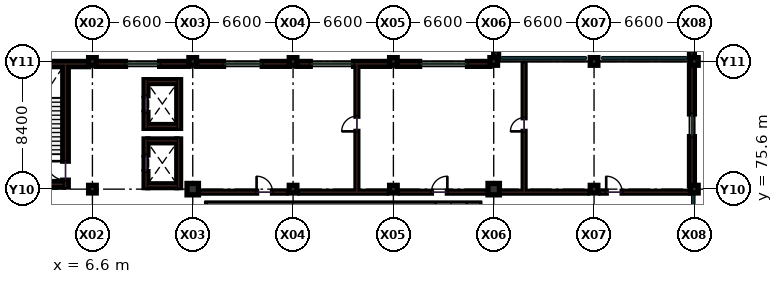
"""IFC4 building model, lengths in metres.
Left out: names, types, materials, properties, quantities, classifications, styles, units other than length and angle.
Written with IfcOpenShell. Run it as: python <this file> out.ifc"""

import sys

from ifc_helpers import new_model, si_unit, direction, frame, frame_2d, origin, origin_2d, place, context, subcontext, project, spatial, rectangle, circle, extrude, element, fill, save


model = new_model("IFC4")
c1 = context("Model", 3, precision=1e-05, world=origin(), true_north=direction((0.0, 1.0)))
c2 = subcontext(c1, "Body", "Model", "MODEL_VIEW")
j1 = project(units=[si_unit("LENGTHUNIT", "METRE"), si_unit("PLANEANGLEUNIT", "RADIAN")], contexts=[c1])
p1 = place(None, origin())
s1 = spatial("IfcSite", under=j1, at=p1, CompositionType="ELEMENT")
p2 = place(p1, origin())
s2 = spatial("IfcBuilding", under=s1, at=p2, CompositionType="ELEMENT")
p3 = place(p2, frame((0.0, 0.0, 9.9)))
s3 = spatial("IfcBuildingStorey", under=s2, at=p3, CompositionType="ELEMENT", Elevation=9.9)
for number, where, z_axis, x_axis in (
    (1, (6.6, 75.6, 0.0), (0.0, 0.0, 1.0), (1.0, 0.0, 0.0)),
    (2, (6.6, 84.0, 0.0), (0.0, 0.0, 1.0), (1.0, 0.0, 0.0)),
):
    element("IfcColumn", number, at=place(p3, frame(where, z_axis=z_axis, x_axis=x_axis)), inside=s3, PredefinedType="COLUMN", context=c2, shape_type="SweptSolid", body=[
        extrude(rectangle(XDim=0.5, YDim=0.5, at=origin_2d()), origin(), (0.0, 0.0, 1.0), 4.5),
    ])
p4 = place(p3, frame((13.2, 75.6, 0.0), z_axis=(0.0, 0.0, 1.0), x_axis=(1.0, 0.0, 0.0)))
e3 = element("IfcColumn", 3, at=p4, inside=s3, PredefinedType="COLUMN", context=c2, shape_type="SweptSolid", body=[
    extrude(circle(Radius=0.375, at=origin_2d()), origin(), (0.0, 0.0, 1.0), 4.5),
])
for number, where, z_axis, x_axis in (
    (4, (13.2, 84.0, 0.0), (0.0, 0.0, 1.0), (1.0, 0.0, 0.0)),
    (5, (19.8, 75.6, 0.0), (0.0, 0.0, 1.0), (1.0, 0.0, 0.0)),
    (6, (19.8, 84.0, 0.0), (0.0, 0.0, 1.0), (1.0, 0.0, 0.0)),
    (7, (26.4, 75.6, 0.0), (0.0, 0.0, 1.0), (1.0, 0.0, 0.0)),
    (8, (26.4, 84.0, 0.0), (0.0, 0.0, 1.0), (1.0, 0.0, 0.0)),
):
    element("IfcColumn", number, at=place(p3, frame(where, z_axis=z_axis, x_axis=x_axis)), inside=s3, PredefinedType="COLUMN", context=c2, shape_type="SweptSolid", body=[
        extrude(rectangle(XDim=0.5, YDim=0.5, at=origin_2d()), origin(), (0.0, 0.0, 1.0), 4.5),
    ])
p5 = place(p3, frame((33.0, 75.6, 0.0), z_axis=(0.0, 0.0, 1.0), x_axis=(1.0, 0.0, 0.0)))
e9 = element("IfcColumn", 9, at=p5, inside=s3, PredefinedType="COLUMN", context=c2, shape_type="SweptSolid", body=[
    extrude(circle(Radius=0.375, at=origin_2d()), origin(), (0.0, 0.0, 1.0), 4.5),
])
for number, where, z_axis, x_axis in (
    (10, (33.0, 84.0, 0.0), (0.0, 0.0, 1.0), (1.0, 0.0, 0.0)),
    (11, (39.6, 75.6, 0.0), (0.0, 0.0, 1.0), (1.0, 0.0, 0.0)),
    (12, (39.6, 84.0, 0.0), (0.0, 0.0, 1.0), (1.0, 0.0, 0.0)),
    (13, (46.2, 75.6, 0.0), (0.0, 0.0, 1.0), (1.0, 0.0, 0.0)),
    (14, (46.2, 84.0, 0.0), (0.0, 0.0, 1.0), (1.0, 0.0, 0.0)),
):
    element("IfcColumn", number, at=place(p3, frame(where, z_axis=z_axis, x_axis=x_axis)), inside=s3, PredefinedType="COLUMN", context=c2, shape_type="SweptSolid", body=[
        extrude(rectangle(XDim=0.5, YDim=0.5, at=origin_2d()), origin(), (0.0, 0.0, 1.0), 4.5),
    ])
p6 = place(p3, frame((12.9, 75.4, 0.0), z_axis=(0.0, 0.0, 1.0), x_axis=(1.0, 0.0, 0.0)))
e15 = element("IfcWall", 15, at=p6, inside=s3, PredefinedType="PARTITIONING", context=c2, shape_type="SweptSolid", body=[
    extrude(rectangle(XDim=6.45, YDim=0.12, at=frame_2d((3.225, 0.0))), origin(), (0.0, 0.0, 1.0), 3.49),
])
p7 = place(p6, frame((4.5, 0.0, 0.0)))
e16 = element("IfcOpeningElement", 16, at=p7, cuts=e15, PredefinedType="OPENING", context=c2, shape_type="SweptSolid", body=[
    extrude(rectangle(XDim=1.05, YDim=2.15, at=frame_2d((0.525, 1.075))), frame((0.0, 0.07, 0.0), z_axis=(0.0, -1.0, 0.0), x_axis=(1.0, 0.0, 0.0)), (0.0, 0.0, 1.0), 0.14),
])
p8 = place(p3, frame((20.25, 75.4, 0.0), z_axis=(0.0, 0.0, 1.0), x_axis=(1.0, 0.0, 0.0)))
e17 = element("IfcWall", 17, at=p8, inside=s3, PredefinedType="PARTITIONING", context=c2, shape_type="SweptSolid", body=[
    extrude(rectangle(XDim=5.7, YDim=0.12, at=frame_2d((2.85, 0.0))), origin(), (0.0, 0.0, 1.0), 3.49),
])
p9 = place(p3, frame((26.85, 75.4, 0.0), z_axis=(0.0, 0.0, 1.0), x_axis=(1.0, 0.0, 0.0)))
e18 = element("IfcWall", 18, at=p9, inside=s3, PredefinedType="PARTITIONING", context=c2, shape_type="SweptSolid", body=[
    extrude(rectangle(XDim=5.7, YDim=0.12, at=frame_2d((2.85, 0.0))), origin(), (0.0, 0.0, 1.0), 3.49),
])
p10 = place(p9, frame((2.05, 0.0, 0.0)))
e19 = element("IfcOpeningElement", 19, at=p10, cuts=e18, PredefinedType="OPENING", context=c2, shape_type="SweptSolid", body=[
    extrude(rectangle(XDim=1.05, YDim=2.15, at=frame_2d((0.525, 1.075))), frame((0.0, 0.07, 0.0), z_axis=(0.0, -1.0, 0.0), x_axis=(1.0, 0.0, 0.0)), (0.0, 0.0, 1.0), 0.14),
])
p11 = place(p3, frame((33.45, 75.4, 0.0), z_axis=(0.0, 0.0, 1.0), x_axis=(1.0, 0.0, 0.0)))
e20 = element("IfcWall", 20, at=p11, inside=s3, PredefinedType="PARTITIONING", context=c2, shape_type="SweptSolid", body=[
    extrude(rectangle(XDim=5.7, YDim=0.12, at=frame_2d((2.85, 0.0))), origin(), (0.0, 0.0, 1.0), 3.49),
])
p12 = place(p3, frame((40.05, 75.4, 0.0), z_axis=(0.0, 0.0, 1.0), x_axis=(1.0, 0.0, 0.0)))
e21 = element("IfcWall", 21, at=p12, inside=s3, PredefinedType="PARTITIONING", context=c2, shape_type="SweptSolid", body=[
    extrude(rectangle(XDim=5.9, YDim=0.12, at=frame_2d((2.95, 0.0))), origin(), (0.0, 0.0, 1.0), 3.49),
])
p13 = place(p12, frame((0.35, 0.0, 0.0)))
e22 = element("IfcOpeningElement", 22, at=p13, cuts=e21, PredefinedType="OPENING", context=c2, shape_type="SweptSolid", body=[
    extrude(rectangle(XDim=1.05, YDim=2.15, at=frame_2d((0.525, 1.075))), frame((0.0, 0.07, 0.0), z_axis=(0.0, -1.0, 0.0), x_axis=(1.0, 0.0, 0.0)), (0.0, 0.0, 1.0), 0.14),
])
p14 = place(p3, frame((24.0, 75.4, 0.0), z_axis=(0.0, 0.0, 1.0), x_axis=(0.0, 1.0, 0.0)))
e23 = element("IfcWall", 23, at=p14, inside=s3, PredefinedType="PARTITIONING", context=c2, shape_type="SweptSolid", body=[
    extrude(rectangle(XDim=8.46, YDim=0.12, at=frame_2d((4.23, 0.0))), origin(), (0.0, 0.0, 1.0), 3.49),
])
p15 = place(p14, frame((4.0, 0.0, 0.0)))
e24 = element("IfcOpeningElement", 24, at=p15, cuts=e23, PredefinedType="OPENING", context=c2, shape_type="SweptSolid", body=[
    extrude(rectangle(XDim=1.0, YDim=2.2, at=frame_2d((0.5, 1.1))), frame((0.0, 0.07, 0.0), z_axis=(0.0, -1.0, 0.0), x_axis=(1.0, 0.0, 0.0)), (0.0, 0.0, 1.0), 0.14),
])
p16 = place(p3, frame((35.0, 75.4, 0.0), z_axis=(0.0, 0.0, 1.0), x_axis=(0.0, 1.0, 0.0)))
e25 = element("IfcWall", 25, at=p16, inside=s3, PredefinedType="PARTITIONING", context=c2, shape_type="SweptSolid", body=[
    extrude(rectangle(XDim=8.46, YDim=0.12, at=frame_2d((4.23, 0.0))), origin(), (0.0, 0.0, 1.0), 3.49),
])
p17 = place(p16, frame((4.0, 0.0, 0.0)))
e26 = element("IfcOpeningElement", 26, at=p17, cuts=e25, PredefinedType="OPENING", context=c2, shape_type="SweptSolid", body=[
    extrude(rectangle(XDim=0.9, YDim=2.1, at=frame_2d((0.45, 1.05))), frame((0.0, 0.07, 0.0), z_axis=(0.0, -1.0, 0.0), x_axis=(1.0, 0.0, 0.0)), (0.0, 0.0, 1.0), 0.14),
])
p18 = place(p3, frame((6.355, 83.83, 0.0), z_axis=(0.0, 0.0, 1.0), x_axis=(-1.0, 0.0, 0.0)))
e27 = element("IfcWall", 27, at=p18, inside=s3, PredefinedType="SHEAR", context=c2, shape_type="SweptSolid", body=[
    extrude(rectangle(XDim=6.11, YDim=0.34, at=frame_2d((3.055, 0.0))), origin(), (0.0, 0.0, 1.0), 4.24),
])
p19 = place(p3, frame((12.955, 83.84, 0.0), z_axis=(0.0, 0.0, 1.0), x_axis=(-1.0, 0.0, 0.0)))
e28 = element("IfcWall", 28, at=p19, inside=s3, PredefinedType="SOLIDWALL", context=c2, shape_type="SweptSolid", body=[
    extrude(rectangle(XDim=6.11, YDim=0.32, at=frame_2d((3.055, 0.0))), origin(), (0.0, 0.0, 1.0), 3.625),
])
p20 = place(p19, frame((1.93, 0.0, 0.95)))
e29 = element("IfcOpeningElement", 29, at=p20, cuts=e28, PredefinedType="OPENING", context=c2, shape_type="SweptSolid", body=[
    extrude(rectangle(XDim=2.25, YDim=1.55, at=frame_2d((1.125, 0.775))), frame((0.0, 0.17, 0.0), z_axis=(0.0, -1.0, 0.0), x_axis=(1.0, 0.0, 0.0)), (0.0, 0.0, 1.0), 0.34),
])
p21 = place(p3, frame((19.555, 83.84, 0.0), z_axis=(0.0, 0.0, 1.0), x_axis=(-1.0, 0.0, 0.0)))
e30 = element("IfcWall", 30, at=p21, inside=s3, PredefinedType="SOLIDWALL", context=c2, shape_type="SweptSolid", body=[
    extrude(rectangle(XDim=6.11, YDim=0.32, at=frame_2d((3.055, 0.0))), origin(), (0.0, 0.0, 1.0), 3.625),
])
p22 = place(p21, frame((1.78, 0.0, 0.95)))
e31 = element("IfcOpeningElement", 31, at=p22, cuts=e30, PredefinedType="OPENING", context=c2, shape_type="SweptSolid", body=[
    extrude(rectangle(XDim=2.55, YDim=1.65, at=frame_2d((1.275, 0.825))), frame((0.0, 0.17, 0.0), z_axis=(0.0, -1.0, 0.0), x_axis=(1.0, 0.0, 0.0)), (0.0, 0.0, 1.0), 0.34),
])
p23 = place(p3, frame((26.155, 83.84, 0.0), z_axis=(0.0, 0.0, 1.0), x_axis=(-1.0, 0.0, 0.0)))
e32 = element("IfcWall", 32, at=p23, inside=s3, PredefinedType="SOLIDWALL", context=c2, shape_type="SweptSolid", body=[
    extrude(rectangle(XDim=6.11, YDim=0.32, at=frame_2d((3.055, 0.0))), origin(), (0.0, 0.0, 1.0), 3.625),
])
p24 = place(p23, frame((2.375, 0.0, 0.95)))
e33 = element("IfcOpeningElement", 33, at=p24, cuts=e32, PredefinedType="OPENING", context=c2, shape_type="SweptSolid", body=[
    extrude(rectangle(XDim=2.85, YDim=1.65, at=frame_2d((1.425, 0.825))), frame((0.0, 0.17, 0.0), z_axis=(0.0, -1.0, 0.0), x_axis=(1.0, 0.0, 0.0)), (0.0, 0.0, 1.0), 0.34),
])
p25 = place(p3, frame((32.755, 83.84, 0.0), z_axis=(0.0, 0.0, 1.0), x_axis=(-1.0, 0.0, 0.0)))
e34 = element("IfcWall", 34, at=p25, inside=s3, PredefinedType="SOLIDWALL", context=c2, shape_type="SweptSolid", body=[
    extrude(rectangle(XDim=6.11, YDim=0.32, at=frame_2d((3.055, 0.0))), origin(), (0.0, 0.0, 1.0), 3.625),
])
p26 = place(p25, frame((1.48, 0.0, 0.95)))
e35 = element("IfcOpeningElement", 35, at=p26, cuts=e34, PredefinedType="OPENING", context=c2, shape_type="SweptSolid", body=[
    extrude(rectangle(XDim=3.15, YDim=1.7, at=frame_2d((1.575, 0.85))), frame((0.0, 0.17, 0.0), z_axis=(0.0, -1.0, 0.0), x_axis=(1.0, 0.0, 0.0)), (0.0, 0.0, 1.0), 0.34),
])
p27 = place(p3, frame((33.16, 92.155, 0.0), z_axis=(0.0, 0.0, 1.0), x_axis=(0.0, -1.0, 0.0)))
e36 = element("IfcWall", 36, at=p27, inside=s3, PredefinedType="SOLIDWALL", context=c2, shape_type="SweptSolid", body=[
    extrude(rectangle(XDim=7.91, YDim=0.32, at=frame_2d((3.955, 0.0))), origin(), (0.0, 0.0, 1.0), 3.625),
])
p28 = place(p27, frame((3.43, 0.0, 0.95)))
e37 = element("IfcOpeningElement", 37, at=p28, cuts=e36, PredefinedType="OPENING", context=c2, shape_type="SweptSolid", body=[
    extrude(rectangle(XDim=1.05, YDim=1.75, at=frame_2d((0.525, 0.875))), frame((0.0, 0.17, 0.0), z_axis=(0.0, -1.0, 0.0), x_axis=(1.0, 0.0, 0.0)), (0.0, 0.0, 1.0), 0.34),
])
p29 = place(p3, frame((46.04, 75.845, 0.0), z_axis=(0.0, 0.0, 1.0), x_axis=(0.0, 1.0, 0.0)))
e38 = element("IfcWall", 38, at=p29, inside=s3, PredefinedType="SOLIDWALL", context=c2, shape_type="SweptSolid", body=[
    extrude(rectangle(XDim=7.91, YDim=0.32, at=frame_2d((3.955, 0.0))), origin(), (0.0, 0.0, 1.0), 3.625),
])
p30 = place(p29, frame((3.205, 0.0, 0.95)))
e39 = element("IfcOpeningElement", 39, at=p30, cuts=e38, PredefinedType="OPENING", context=c2, shape_type="SweptSolid", body=[
    extrude(rectangle(XDim=1.5, YDim=2.1, at=frame_2d((0.75, 1.05))), frame((0.0, 0.17, 0.0), z_axis=(0.0, -1.0, 0.0), x_axis=(1.0, 0.0, 0.0)), (0.0, 0.0, 1.0), 0.34),
])
p31 = place(p3, frame((46.04, 84.245, 0.0), z_axis=(0.0, 0.0, 1.0), x_axis=(0.0, 1.0, 0.0)))
e40 = element("IfcWall", 40, at=p31, inside=s3, PredefinedType="SOLIDWALL", context=c2, shape_type="SweptSolid", body=[
    extrude(rectangle(XDim=7.91, YDim=0.32, at=frame_2d((3.955, 0.0))), origin(), (0.0, 0.0, 1.0), 3.625),
])
p32 = place(p31, frame((3.43, 0.0, 0.95)))
e41 = element("IfcOpeningElement", 41, at=p32, cuts=e40, PredefinedType="OPENING", context=c2, shape_type="SweptSolid", body=[
    extrude(rectangle(XDim=1.05, YDim=1.75, at=frame_2d((0.525, 0.875))), frame((0.0, 0.17, 0.0), z_axis=(0.0, -1.0, 0.0), x_axis=(1.0, 0.0, 0.0)), (0.0, 0.0, 1.0), 0.34),
])
p33 = place(p3, frame((4.83, 75.74, 0.0), z_axis=(0.0, 0.0, 1.0), x_axis=(0.0, 1.0, 0.0)))
e42 = element("IfcWall", 42, at=p33, inside=s3, PredefinedType="SHEAR", context=c2, shape_type="SweptSolid", body=[
    extrude(rectangle(XDim=8.09, YDim=0.36, at=frame_2d((4.045, 0.0))), origin(), (0.0, 0.0, 1.0), 4.24),
])
p34 = place(p33, frame((0.45, 0.0, 0.0)))
e43 = element("IfcOpeningElement", 43, at=p34, cuts=e42, PredefinedType="OPENING", context=c2, shape_type="SweptSolid", body=[
    extrude(rectangle(XDim=1.25, YDim=2.15, at=frame_2d((0.625, 1.075))), frame((0.0, 0.19, 0.0), z_axis=(0.0, -1.0, 0.0), x_axis=(1.0, 0.0, 0.0)), (0.0, 0.0, 1.0), 0.38),
])
p35 = place(p3, frame((0.85, 75.92, 0.0), z_axis=(0.0, 0.0, 1.0), x_axis=(1.0, 0.0, 0.0)))
e44 = element("IfcWall", 44, at=p35, inside=s3, PredefinedType="SHEAR", context=c2, shape_type="SweptSolid", body=[
    extrude(rectangle(XDim=3.8, YDim=0.36, at=frame_2d((1.9, 0.0))), origin(), (0.0, 0.0, 1.0), 4.24),
])
p36 = place(p3, frame((10.125, 75.7, 0.0), z_axis=(0.0, 0.0, 1.0), x_axis=(0.0, 1.0, 0.0)))
e45 = element("IfcWall", 45, at=p36, inside=s3, PredefinedType="SHEAR", context=c2, shape_type="SweptSolid", body=[
    extrude(rectangle(XDim=3.2, YDim=0.25, at=frame_2d((1.6, 0.0))), origin(), (0.0, 0.0, 1.0), 4.24),
])
p37 = place(p36, frame((1.05, 0.0, 0.0)))
e46 = element("IfcOpeningElement", 46, at=p37, cuts=e45, PredefinedType="OPENING", context=c2, shape_type="SweptSolid", body=[
    extrude(rectangle(XDim=1.1, YDim=2.15, at=frame_2d((0.55, 1.075))), frame((0.0, 0.135, 0.0), z_axis=(0.0, -1.0, 0.0), x_axis=(1.0, 0.0, 0.0)), (0.0, 0.0, 1.0), 0.27),
])
p38 = place(p3, frame((12.275, 75.7, 0.0), z_axis=(0.0, 0.0, 1.0), x_axis=(0.0, 1.0, 0.0)))
e47 = element("IfcWall", 47, at=p38, inside=s3, PredefinedType="SHEAR", context=c2, shape_type="SweptSolid", body=[
    extrude(rectangle(XDim=3.2, YDim=0.25, at=frame_2d((1.6, 0.0))), origin(), (0.0, 0.0, 1.0), 4.24),
])
for number, where, z_axis, x_axis in (
    (48, (10.25, 75.825, 0.0), (0.0, 0.0, 1.0), (1.0, 0.0, 0.0)),
    (49, (10.25, 78.775, 0.0), (0.0, 0.0, 1.0), (1.0, 0.0, 0.0)),
):
    element("IfcWall", number, at=place(p3, frame(where, z_axis=z_axis, x_axis=x_axis)), inside=s3, PredefinedType="SHEAR", context=c2, shape_type="SweptSolid", body=[
        extrude(rectangle(XDim=1.9, YDim=0.25, at=frame_2d((0.95, 0.0))), origin(), (0.0, 0.0, 1.0), 4.24),
    ])
p39 = place(p3, frame((10.125, 79.6, 0.0), z_axis=(0.0, 0.0, 1.0), x_axis=(0.0, 1.0, 0.0)))
e50 = element("IfcWall", 50, at=p39, inside=s3, PredefinedType="SHEAR", context=c2, shape_type="SweptSolid", body=[
    extrude(rectangle(XDim=3.2, YDim=0.25, at=frame_2d((1.6, 0.0))), origin(), (0.0, 0.0, 1.0), 4.24),
])
p40 = place(p39, frame((1.05, 0.0, 0.0)))
e51 = element("IfcOpeningElement", 51, at=p40, cuts=e50, PredefinedType="OPENING", context=c2, shape_type="SweptSolid", body=[
    extrude(rectangle(XDim=1.1, YDim=2.15, at=frame_2d((0.55, 1.075))), frame((0.0, 0.135, 0.0), z_axis=(0.0, -1.0, 0.0), x_axis=(1.0, 0.0, 0.0)), (0.0, 0.0, 1.0), 0.27),
])
p41 = place(p3, frame((12.275, 79.6, 0.0), z_axis=(0.0, 0.0, 1.0), x_axis=(0.0, 1.0, 0.0)))
e52 = element("IfcWall", 52, at=p41, inside=s3, PredefinedType="SHEAR", context=c2, shape_type="SweptSolid", body=[
    extrude(rectangle(XDim=3.2, YDim=0.25, at=frame_2d((1.6, 0.0))), origin(), (0.0, 0.0, 1.0), 4.24),
])
for number, where, z_axis, x_axis in (
    (53, (10.25, 79.725, 0.0), (0.0, 0.0, 1.0), (1.0, 0.0, 0.0)),
    (54, (10.25, 82.675, 0.0), (0.0, 0.0, 1.0), (1.0, 0.0, 0.0)),
):
    element("IfcWall", number, at=place(p3, frame(where, z_axis=z_axis, x_axis=x_axis)), inside=s3, PredefinedType="SHEAR", context=c2, shape_type="SweptSolid", body=[
        extrude(rectangle(XDim=1.9, YDim=0.25, at=frame_2d((0.95, 0.0))), origin(), (0.0, 0.0, 1.0), 4.24),
    ])
p42 = place(p7, origin())
e55 = element("IfcDoor", 55, at=p42, inside=s3, OperationType="SINGLE_SWING_LEFT", PredefinedType="DOOR", context=c2, shape_type="SweptSolid", body=[
    extrude(rectangle(XDim=1.05, YDim=2.15, at=frame_2d((0.525, 1.075))), frame((0.0, 0.025, 0.0), z_axis=(0.0, -1.0, 0.0), x_axis=(1.0, 0.0, 0.0)), (0.0, 0.0, 1.0), 0.05),
])
fill(e16, e55)
p43 = place(p10, origin())
e56 = element("IfcDoor", 56, at=p43, inside=s3, OperationType="SINGLE_SWING_RIGHT", PredefinedType="DOOR", context=c2, shape_type="SweptSolid", body=[
    extrude(rectangle(XDim=1.05, YDim=2.15, at=frame_2d((0.525, 1.075))), frame((0.0, 0.025, 0.0), z_axis=(0.0, -1.0, 0.0), x_axis=(1.0, 0.0, 0.0)), (0.0, 0.0, 1.0), 0.05),
])
fill(e19, e56)
p44 = place(p13, origin())
e57 = element("IfcDoor", 57, at=p44, inside=s3, OperationType="SINGLE_SWING_LEFT", PredefinedType="DOOR", context=c2, shape_type="SweptSolid", body=[
    extrude(rectangle(XDim=1.05, YDim=2.15, at=frame_2d((0.525, 1.075))), frame((0.0, 0.025, 0.0), z_axis=(0.0, -1.0, 0.0), x_axis=(1.0, 0.0, 0.0)), (0.0, 0.0, 1.0), 0.05),
])
fill(e22, e57)
p45 = place(p15, origin())
e58 = element("IfcDoor", 58, at=p45, inside=s3, OperationType="SINGLE_SWING_LEFT", PredefinedType="DOOR", context=c2, shape_type="SweptSolid", body=[
    extrude(rectangle(XDim=1.0, YDim=2.2, at=frame_2d((0.5, 1.1))), frame((0.0, 0.025, 0.0), z_axis=(0.0, -1.0, 0.0), x_axis=(1.0, 0.0, 0.0)), (0.0, 0.0, 1.0), 0.05),
])
fill(e24, e58)
p46 = place(p17, origin())
e59 = element("IfcDoor", 59, at=p46, inside=s3, OperationType="SINGLE_SWING_LEFT", PredefinedType="DOOR", context=c2, shape_type="SweptSolid", body=[
    extrude(rectangle(XDim=0.9, YDim=2.1, at=frame_2d((0.45, 1.05))), frame((0.0, 0.025, 0.0), z_axis=(0.0, -1.0, 0.0), x_axis=(1.0, 0.0, 0.0)), (0.0, 0.0, 1.0), 0.05),
])
fill(e26, e59)
p47 = place(p20, origin())
e60 = element("IfcWindow", 60, at=p47, inside=s3, PartitioningType="SINGLE_PANEL", PredefinedType="WINDOW", context=c2, shape_type="SweptSolid", body=[
    extrude(rectangle(XDim=2.25, YDim=1.55, at=frame_2d((1.125, 0.775))), frame((0.0, 0.03, 0.0), z_axis=(0.0, -1.0, 0.0), x_axis=(1.0, 0.0, 0.0)), (0.0, 0.0, 1.0), 0.06),
])
fill(e29, e60)
p48 = place(p22, origin())
e61 = element("IfcWindow", 61, at=p48, inside=s3, PartitioningType="SINGLE_PANEL", PredefinedType="WINDOW", context=c2, shape_type="SweptSolid", body=[
    extrude(rectangle(XDim=2.55, YDim=1.65, at=frame_2d((1.275, 0.825))), frame((0.0, 0.03, 0.0), z_axis=(0.0, -1.0, 0.0), x_axis=(1.0, 0.0, 0.0)), (0.0, 0.0, 1.0), 0.06),
])
fill(e31, e61)
p49 = place(p24, origin())
e62 = element("IfcWindow", 62, at=p49, inside=s3, PartitioningType="SINGLE_PANEL", PredefinedType="WINDOW", context=c2, shape_type="SweptSolid", body=[
    extrude(rectangle(XDim=2.85, YDim=1.65, at=frame_2d((1.425, 0.825))), frame((0.0, 0.03, 0.0), z_axis=(0.0, -1.0, 0.0), x_axis=(1.0, 0.0, 0.0)), (0.0, 0.0, 1.0), 0.06),
])
fill(e33, e62)
p50 = place(p26, origin())
e63 = element("IfcWindow", 63, at=p50, inside=s3, PartitioningType="SINGLE_PANEL", PredefinedType="WINDOW", context=c2, shape_type="SweptSolid", body=[
    extrude(rectangle(XDim=3.15, YDim=1.7, at=frame_2d((1.575, 0.85))), frame((0.0, 0.03, 0.0), z_axis=(0.0, -1.0, 0.0), x_axis=(1.0, 0.0, 0.0)), (0.0, 0.0, 1.0), 0.06),
])
fill(e35, e63)
p51 = place(p30, origin())
e64 = element("IfcWindow", 64, at=p51, inside=s3, PartitioningType="SINGLE_PANEL", PredefinedType="WINDOW", context=c2, shape_type="SweptSolid", body=[
    extrude(rectangle(XDim=1.5, YDim=2.1, at=frame_2d((0.75, 1.05))), frame((0.0, 0.03, 0.0), z_axis=(0.0, -1.0, 0.0), x_axis=(1.0, 0.0, 0.0)), (0.0, 0.0, 1.0), 0.06),
])
fill(e39, e64)
p52 = place(p34, origin())
e65 = element("IfcDoor", 65, at=p52, inside=s3, OperationType="SINGLE_SWING_RIGHT", PredefinedType="DOOR", context=c2, shape_type="SweptSolid", body=[
    extrude(rectangle(XDim=1.25, YDim=2.15, at=frame_2d((0.625, 1.075))), frame((0.0, 0.025, 0.0), z_axis=(0.0, -1.0, 0.0), x_axis=(1.0, 0.0, 0.0)), (0.0, 0.0, 1.0), 0.05),
])
fill(e43, e65)
p53 = place(p37, origin())
e66 = element("IfcDoor", 66, at=p53, inside=s3, OperationType="SLIDING_TO_LEFT", PredefinedType="DOOR", context=c2, shape_type="SweptSolid", body=[
    extrude(rectangle(XDim=1.1, YDim=2.15, at=frame_2d((0.55, 1.075))), frame((0.0, 0.025, 0.0), z_axis=(0.0, -1.0, 0.0), x_axis=(1.0, 0.0, 0.0)), (0.0, 0.0, 1.0), 0.05),
])
fill(e46, e66)
p54 = place(p40, origin())
e67 = element("IfcDoor", 67, at=p54, inside=s3, OperationType="SLIDING_TO_LEFT", PredefinedType="DOOR", context=c2, shape_type="SweptSolid", body=[
    extrude(rectangle(XDim=1.1, YDim=2.15, at=frame_2d((0.55, 1.075))), frame((0.0, 0.025, 0.0), z_axis=(0.0, -1.0, 0.0), x_axis=(1.0, 0.0, 0.0)), (0.0, 0.0, 1.0), 0.05),
])
fill(e51, e67)
save(model, sys.argv[1])
